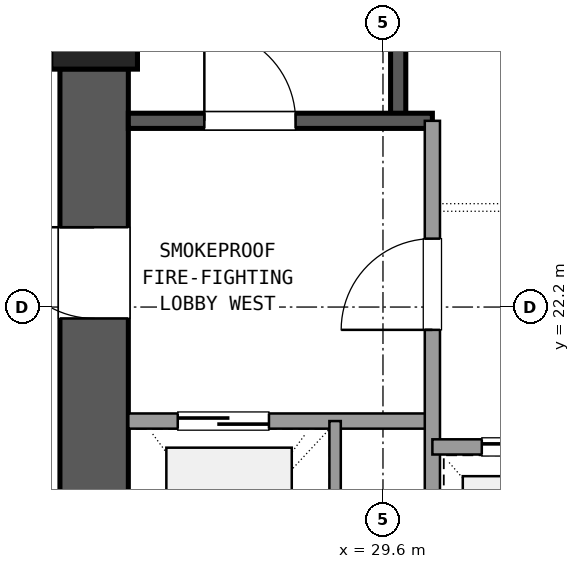
"""IFC4 building model, lengths in metres.
Left out: names, types, materials, properties, quantities, classifications, styles, units other than length and angle.
Written with IfcOpenShell. Run it as: python <this file> out.ifc"""

import sys

from ifc_helpers import new_model, si_unit, direction, frame, frame_2d, origin, origin_2d, place, context, subcontext, project, spatial, rectangle, extrude, element, fill, save


model = new_model("IFC4")
c1 = context("Model", 3, precision=1e-05, world=origin(), true_north=direction((0.0, 1.0)))
c2 = subcontext(c1, "Body", "Model", "MODEL_VIEW")
j1 = project(units=[si_unit("LENGTHUNIT", "METRE"), si_unit("PLANEANGLEUNIT", "RADIAN")], contexts=[c1])
p1 = place(None, origin())
s1 = spatial("IfcSite", under=j1, at=p1, CompositionType="ELEMENT")
p2 = place(p1, origin())
s2 = spatial("IfcBuilding", under=s1, at=p2, CompositionType="ELEMENT")
p3 = place(p2, frame((0.0, 0.0, 63.54)))
s3 = spatial("IfcBuildingStorey", under=s2, at=p3, CompositionType="ELEMENT", Elevation=63.54)
p4 = place(p3, frame((25.8, 25.9, 0.0), z_axis=(0.0, 0.0, 1.0), x_axis=(1.0, 0.0, 0.0)))
e1 = element("IfcColumn", 1, at=p4, inside=s3, PredefinedType="COLUMN", context=c2, shape_type="SweptSolid", body=[
    extrude(rectangle(XDim=1.14, YDim=1.14, at=origin_2d()), origin(), (0.0, 0.0, 1.0), 3.6),
])
p5 = place(p3, frame((25.8, 25.335, 0.0), z_axis=(0.0, 0.0, 1.0), x_axis=(0.0, -1.0, 0.0)))
e2 = element("IfcWall", 2, at=p5, inside=s3, PredefinedType="SHEAR", context=c2, shape_type="SweptSolid", body=[
    extrude(rectangle(XDim=7.47, YDim=0.9, at=frame_2d((3.735, 0.0))), origin(), (0.0, 0.0, 1.0), 3.32),
])
p6 = place(p5, frame((2.085, 0.0, 0.0)))
e3 = element("IfcOpeningElement", 3, at=p6, cuts=e2, PredefinedType="OPENING", context=c2, shape_type="SweptSolid", body=[
    extrude(rectangle(XDim=1.2, YDim=2.15, at=frame_2d((0.6, 1.075))), frame((0.0, 0.46, 0.0), z_axis=(0.0, -1.0, 0.0), x_axis=(1.0, 0.0, 0.0)), (0.0, 0.0, 1.0), 0.92),
])
p7 = place(p3, frame((29.8, 24.65, 0.0), z_axis=(0.0, 0.0, 1.0), x_axis=(0.0, 1.0, 0.0)))
e4 = element("IfcWall", 4, at=p7, inside=s3, PredefinedType="SHEAR", context=c2, shape_type="SweptSolid", body=[
    extrude(rectangle(XDim=9.4, YDim=0.2, at=frame_2d((4.7, 0.0))), origin(), (0.0, 0.0, 1.0), 3.32),
])
p8 = place(p3, frame((26.25, 24.65, 0.0), z_axis=(0.0, 0.0, 1.0), x_axis=(1.0, 0.0, 0.0)))
e5 = element("IfcWall", 5, at=p8, inside=s3, PredefinedType="SHEAR", context=c2, shape_type="SweptSolid", body=[
    extrude(rectangle(XDim=4.0, YDim=0.2, at=frame_2d((2.0, 0.0))), origin(), (0.0, 0.0, 1.0), 3.32),
])
p9 = place(p8, frame((1.0, 0.0, 0.0)))
e6 = element("IfcOpeningElement", 6, at=p9, cuts=e5, PredefinedType="OPENING", context=c2, shape_type="SweptSolid", body=[
    extrude(rectangle(XDim=1.2, YDim=2.15, at=frame_2d((0.6, 1.075))), frame((0.0, 0.11, 0.0), z_axis=(0.0, -1.0, 0.0), x_axis=(1.0, 0.0, 0.0)), (0.0, 0.0, 1.0), 0.22),
])
p10 = place(p3, frame((26.25, 20.7, 0.0), z_axis=(0.0, 0.0, 1.0), x_axis=(1.0, 0.0, 0.0)))
e7 = element("IfcWall", 7, at=p10, inside=s3, PredefinedType="SOLIDWALL", context=c2, shape_type="SweptSolid", body=[
    extrude(rectangle(XDim=4.0, YDim=0.2, at=frame_2d((2.0, 0.0))), origin(), (0.0, 0.0, 1.0), 2.61),
])
p11 = place(p10, frame((0.65, 0.0, 0.0)))
e8 = element("IfcOpeningElement", 8, at=p11, cuts=e7, PredefinedType="OPENING", context=c2, shape_type="SweptSolid", body=[
    extrude(rectangle(XDim=1.2, YDim=2.15, at=frame_2d((0.6, 1.075))), frame((0.0, 0.11, 0.0), z_axis=(0.0, -1.0, 0.0), x_axis=(1.0, 0.0, 0.0)), (0.0, 0.0, 1.0), 0.22),
])
p12 = place(p3, frame((30.25, 17.75, 0.0), z_axis=(0.0, 0.0, 1.0), x_axis=(0.0, 1.0, 0.0)))
e9 = element("IfcWall", 9, at=p12, inside=s3, PredefinedType="SOLIDWALL", context=c2, shape_type="SweptSolid", body=[
    extrude(rectangle(XDim=6.9, YDim=0.2, at=frame_2d((3.45, 0.0))), origin(), (0.0, 0.0, 1.0), 2.61),
])
p13 = place(p12, frame((4.15, 0.0, 0.0)))
e10 = element("IfcOpeningElement", 10, at=p13, cuts=e9, PredefinedType="OPENING", context=c2, shape_type="SweptSolid", body=[
    extrude(rectangle(XDim=1.2, YDim=2.15, at=frame_2d((0.6, 1.075))), frame((0.0, 0.11, 0.0), z_axis=(0.0, -1.0, 0.0), x_axis=(1.0, 0.0, 0.0)), (0.0, 0.0, 1.0), 0.22),
])
p14 = place(p3, frame((28.97, 17.75, 0.0), z_axis=(0.0, 0.0, 1.0), x_axis=(0.0, 1.0, 0.0)))
e11 = element("IfcWall", 11, at=p14, inside=s3, PredefinedType="PARTITIONING", context=c2, shape_type="SweptSolid", body=[
    extrude(rectangle(XDim=2.95, YDim=0.15, at=frame_2d((1.475, 0.0))), origin(), (0.0, 0.0, 1.0), 2.61),
])
p15 = place(p3, frame((30.25, 20.36, 0.0), z_axis=(0.0, 0.0, 1.0), x_axis=(1.0, 0.0, 0.0)))
e12 = element("IfcWall", 12, at=p15, inside=s3, PredefinedType="SOLIDWALL", context=c2, shape_type="SweptSolid", body=[
    extrude(rectangle(XDim=7.0, YDim=0.2, at=frame_2d((3.5, 0.0))), origin(), (0.0, 0.0, 1.0), 2.61),
])
p16 = place(p15, frame((0.65, 0.0, 0.0)))
e13 = element("IfcOpeningElement", 13, at=p16, cuts=e12, PredefinedType="OPENING", context=c2, shape_type="SweptSolid", body=[
    extrude(rectangle(XDim=1.1, YDim=2.15, at=frame_2d((0.55, 1.075))), frame((0.0, 0.11, 0.0), z_axis=(0.0, -1.0, 0.0), x_axis=(1.0, 0.0, 0.0)), (0.0, 0.0, 1.0), 0.22),
])
p17 = place(p15, frame((2.95, 0.0, 0.0)))
e14 = element("IfcOpeningElement", 14, at=p17, cuts=e12, PredefinedType="OPENING", context=c2, shape_type="SweptSolid", body=[
    extrude(rectangle(XDim=1.1, YDim=2.15, at=frame_2d((0.55, 1.075))), frame((0.0, 0.11, 0.0), z_axis=(0.0, -1.0, 0.0), x_axis=(1.0, 0.0, 0.0)), (0.0, 0.0, 1.0), 0.22),
])
p18 = place(p15, frame((5.25, 0.0, 0.0)))
e15 = element("IfcOpeningElement", 15, at=p18, cuts=e12, PredefinedType="OPENING", context=c2, shape_type="SweptSolid", body=[
    extrude(rectangle(XDim=1.1, YDim=2.15, at=frame_2d((0.55, 1.075))), frame((0.0, 0.11, 0.0), z_axis=(0.0, -1.0, 0.0), x_axis=(1.0, 0.0, 0.0)), (0.0, 0.0, 1.0), 0.22),
])
p19 = place(p9, origin())
e16 = element("IfcDoor", 16, at=p19, inside=s3, OperationType="SINGLE_SWING_LEFT", PredefinedType="DOOR", context=c2, shape_type="SweptSolid", body=[
    extrude(rectangle(XDim=1.2, YDim=2.15, at=frame_2d((0.6, 1.075))), frame((0.0, 0.025, 0.0), z_axis=(0.0, -1.0, 0.0), x_axis=(1.0, 0.0, 0.0)), (0.0, 0.0, 1.0), 0.05),
])
fill(e6, e16)
p20 = place(p11, origin())
e17 = element("IfcDoor", 17, at=p20, inside=s3, OperationType="SLIDING_TO_LEFT", PredefinedType="DOOR", context=c2, shape_type="SweptSolid", body=[
    extrude(rectangle(XDim=1.2, YDim=2.15, at=frame_2d((0.6, 1.075))), frame((0.0, 0.025, 0.0), z_axis=(0.0, -1.0, 0.0), x_axis=(1.0, 0.0, 0.0)), (0.0, 0.0, 1.0), 0.05),
])
fill(e8, e17)
p21 = place(p13, origin())
e18 = element("IfcDoor", 18, at=p21, inside=s3, OperationType="SINGLE_SWING_LEFT", PredefinedType="DOOR", context=c2, shape_type="SweptSolid", body=[
    extrude(rectangle(XDim=1.2, YDim=2.15, at=frame_2d((0.6, 1.075))), frame((0.0, 0.025, 0.0), z_axis=(0.0, -1.0, 0.0), x_axis=(1.0, 0.0, 0.0)), (0.0, 0.0, 1.0), 0.05),
])
fill(e10, e18)
p22 = place(p6, frame((1.2, 0.0, 0.0), z_axis=(0.0, 0.0, 1.0), x_axis=(-1.0, 0.0, 0.0)))
e19 = element("IfcDoor", 19, at=p22, inside=s3, OperationType="SINGLE_SWING_LEFT", PredefinedType="DOOR", context=c2, shape_type="SweptSolid", body=[
    extrude(rectangle(XDim=1.2, YDim=2.15, at=frame_2d((0.6, 1.075))), frame((0.0, 0.025, 0.0), z_axis=(0.0, -1.0, 0.0), x_axis=(1.0, 0.0, 0.0)), (0.0, 0.0, 1.0), 0.05),
])
fill(e3, e19)
p23 = place(p16, origin())
e20 = element("IfcDoor", 20, at=p23, inside=s3, OperationType="SLIDING_TO_LEFT", PredefinedType="DOOR", context=c2, shape_type="SweptSolid", body=[
    extrude(rectangle(XDim=1.1, YDim=2.15, at=frame_2d((0.55, 1.075))), frame((0.0, 0.025, 0.0), z_axis=(0.0, -1.0, 0.0), x_axis=(1.0, 0.0, 0.0)), (0.0, 0.0, 1.0), 0.05),
])
fill(e13, e20)
save(model, sys.argv[1])
